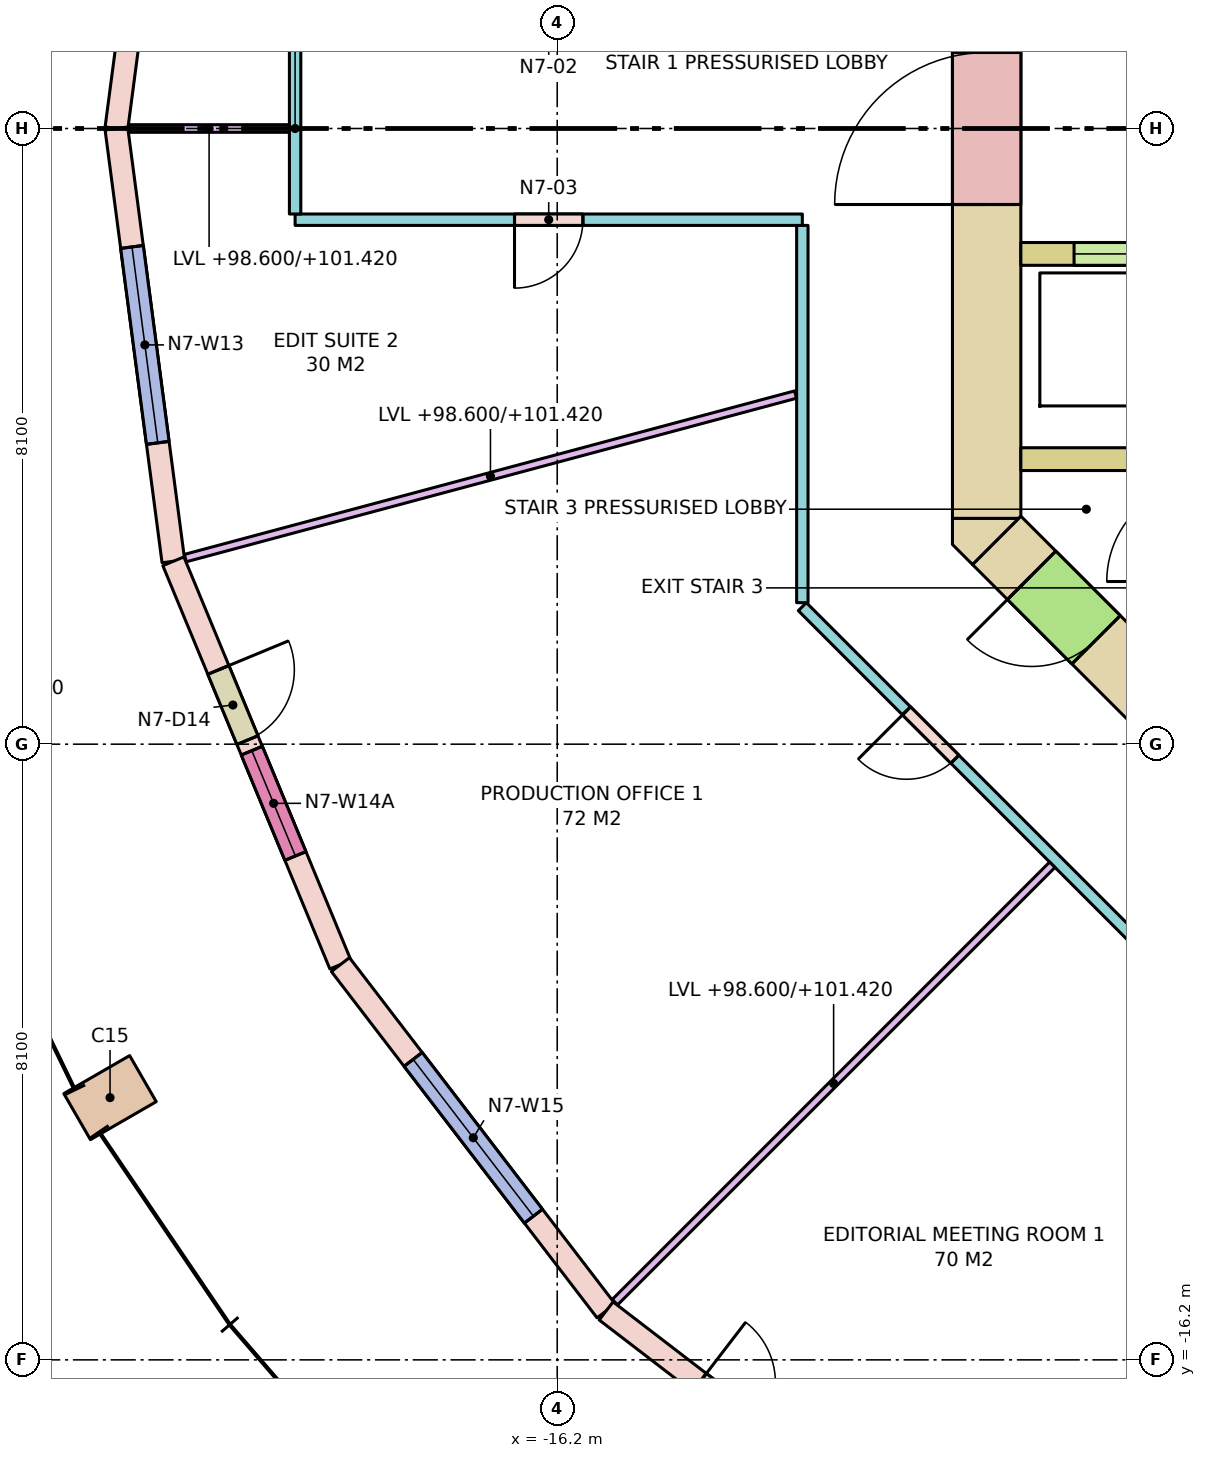
"""IFC4 building model, lengths in metres.
Left out: names, types, materials, properties, quantities, classifications, styles, units other than length and angle.
Written with IfcOpenShell. Run it as: python <this file> out.ifc"""

import sys

from ifc_helpers import new_model, si_unit, direction, frame, frame_2d, origin, origin_2d, place, context, subcontext, project, spatial, polyline, rectangle, outline, extrude, element, fill, save


model = new_model("IFC4")
c1 = context("Model", 3, precision=1e-05, world=origin(), true_north=direction((0.0, 1.0)))
c2 = subcontext(c1, "Body", "Model", "MODEL_VIEW")
j1 = project(units=[si_unit("LENGTHUNIT", "METRE"), si_unit("PLANEANGLEUNIT", "RADIAN")], contexts=[c1])
p1 = place(None, origin())
s1 = spatial("IfcSite", under=j1, at=p1, CompositionType="ELEMENT")
p2 = place(p1, origin())
s2 = spatial("IfcBuilding", under=s1, at=p2, CompositionType="ELEMENT")
p3 = place(p2, frame((0.0, 0.0, 98.6)))
s3 = spatial("IfcBuildingStorey", under=s2, at=p3, CompositionType="ELEMENT", Elevation=98.6)
p4 = place(p3, frame((-22.084, -12.75, 0.0), z_axis=(0.0, 0.0, 1.0), x_axis=(0.5, -0.866025403784, 0.0)))
e1 = element("IfcColumn", 1, at=p4, inside=s3, PredefinedType="COLUMN", context=c2, shape_type="SweptSolid", body=[
    extrude(rectangle(XDim=0.7, YDim=1.0, at=origin_2d()), origin(), (0.0, 0.0, 1.0), 4.0),
])
p5 = place(p3, frame((-10.55, -5.13, -0.28), z_axis=(0.0, 0.0, 1.0), x_axis=(0.0, 1.0, 0.0)))
e2 = element("IfcWall", 2, at=p5, inside=s3, PredefinedType="SHEAR", context=c2, shape_type="SweptSolid", body=[
    extrude(rectangle(XDim=10.26, YDim=0.9, at=frame_2d((5.13, 0.0))), origin(), (0.0, 0.0, 1.0), 4.0),
])
p6 = place(p5, frame((4.13, 0.0, 0.28)))
e3 = element("IfcOpeningElement", 3, at=p6, cuts=e2, PredefinedType="OPENING", context=c2, shape_type="SweptSolid", body=[
    extrude(rectangle(XDim=2.0, YDim=2.1, at=frame_2d((1.0, 1.05))), frame((0.0, 0.46, 0.0), z_axis=(0.0, -1.0, 0.0), x_axis=(1.0, 0.0, 0.0)), (0.0, 0.0, 1.0), 0.92),
])
p7 = place(p3, frame((-7.418, -8.418, -0.28), z_axis=(0.0, 0.0, 1.0), x_axis=(-0.707106781187, 0.707106781187, 0.0)))
e4 = element("IfcWall", 4, at=p7, inside=s3, PredefinedType="SHEAR", context=c2, shape_type="SweptSolid", body=[
    extrude(rectangle(XDim=4.243, YDim=0.9, at=frame_2d((2.121, 0.0))), origin(), (0.0, 0.0, 1.0), 4.0),
])
p8 = place(p7, frame((2.393, 0.0, 0.28)))
e5 = element("IfcOpeningElement", 5, at=p8, cuts=e4, PredefinedType="OPENING", context=c2, shape_type="SweptSolid", body=[
    extrude(rectangle(XDim=1.2, YDim=2.1, at=frame_2d((0.6, 1.05))), frame((0.0, 0.46, 0.0), z_axis=(0.0, -1.0, 0.0), x_axis=(1.0, 0.0, 0.0)), (0.0, 0.0, 1.0), 0.92),
])
p9 = place(p3, frame((0.0, 0.0, -0.28)))
e6 = element("IfcWall", 6, at=p9, inside=s3, PredefinedType="SHEAR", context=c2, shape_type="SweptSolid", body=[
    extrude(outline(polyline([(-11.0, -5.473), (-11.0, -5.13), (-10.13, -5.13), (-10.736, -5.736), (-11.0, -5.473)])), origin(), (0.0, 0.0, 1.0), 4.0),
])
p10 = place(p3, frame((-10.1, -4.35, 0.0), z_axis=(0.0, 0.0, 1.0), x_axis=(1.0, 0.0, 0.0)))
e7 = element("IfcWall", 7, at=p10, inside=s3, PredefinedType="SOLIDWALL", context=c2, shape_type="SweptSolid", body=[
    extrude(rectangle(XDim=8.1, YDim=0.3, at=frame_2d((4.05, 0.0))), origin(), (0.0, 0.0, 1.0), 3.72),
])
p11 = place(p3, frame((-10.1, -1.65, 0.0), z_axis=(0.0, 0.0, 1.0), x_axis=(1.0, 0.0, 0.0)))
e8 = element("IfcWall", 8, at=p11, inside=s3, PredefinedType="SOLIDWALL", context=c2, shape_type="SweptSolid", body=[
    extrude(rectangle(XDim=8.1, YDim=0.3, at=frame_2d((4.05, 0.0))), origin(), (0.0, 0.0, 1.0), 3.72),
])
p12 = place(p11, frame((0.7, 0.0, 0.0)))
e9 = element("IfcOpeningElement", 9, at=p12, cuts=e8, PredefinedType="OPENING", context=c2, shape_type="SweptSolid", body=[
    extrude(rectangle(XDim=1.1, YDim=2.1, at=frame_2d((0.55, 1.05))), frame((0.0, 0.16, 0.0), z_axis=(0.0, -1.0, 0.0), x_axis=(1.0, 0.0, 0.0)), (0.0, 0.0, 1.0), 0.32),
])
p13 = place(p11, frame((3.5, 0.0, 0.0)))
e10 = element("IfcOpeningElement", 10, at=p13, cuts=e8, PredefinedType="OPENING", context=c2, shape_type="SweptSolid", body=[
    extrude(rectangle(XDim=1.1, YDim=2.1, at=frame_2d((0.55, 1.05))), frame((0.0, 0.16, 0.0), z_axis=(0.0, -1.0, 0.0), x_axis=(1.0, 0.0, 0.0)), (0.0, 0.0, 1.0), 0.32),
])
p14 = place(p11, frame((6.15, 0.0, 0.0)))
e11 = element("IfcOpeningElement", 11, at=p14, cuts=e8, PredefinedType="OPENING", context=c2, shape_type="SweptSolid", body=[
    extrude(rectangle(XDim=1.1, YDim=2.1, at=frame_2d((0.55, 1.05))), frame((0.0, 0.16, 0.0), z_axis=(0.0, -1.0, 0.0), x_axis=(1.0, 0.0, 0.0)), (0.0, 0.0, 1.0), 0.32),
])
p15 = place(p3, frame((-21.25, 5.694, 0.0), z_axis=(0.0, 0.0, 1.0), x_axis=(-0.130503995834, -0.991447783331, 0.0)))
e12 = element("IfcWall", 12, at=p15, inside=s3, PredefinedType="STANDARD", context=c2, shape_type="SweptSolid", body=[
    extrude(rectangle(XDim=5.743, YDim=0.3, at=frame_2d((2.872, 0.0))), origin(), (0.0, 0.0, 1.0), 3.72),
])
p16 = place(p15, frame((1.547, 0.0, 0.0)))
e13 = element("IfcOpeningElement", 13, at=p16, cuts=e12, PredefinedType="OPENING", context=c2, shape_type="SweptSolid", body=[
    extrude(rectangle(XDim=1.0, YDim=2.4, at=frame_2d((0.5, 1.2))), frame((0.0, 0.16, 0.0), z_axis=(0.0, -1.0, 0.0), x_axis=(1.0, 0.0, 0.0)), (0.0, 0.0, 1.0), 0.32),
])
p17 = place(p15, frame((2.697, 0.0, 0.8)))
e14 = element("IfcOpeningElement", 14, at=p17, cuts=e12, PredefinedType="OPENING", context=c2, shape_type="SweptSolid", body=[
    extrude(rectangle(XDim=1.5, YDim=2.7, at=frame_2d((0.75, 1.35))), frame((0.0, 0.16, 0.0), z_axis=(0.0, -1.0, 0.0), x_axis=(1.0, 0.0, 0.0)), (0.0, 0.0, 1.0), 0.32),
])
p18 = place(p3, frame((-22.0, 0.0, 0.0), z_axis=(0.0, 0.0, 1.0), x_axis=(0.130503995834, -0.991447783331, 0.0)))
e15 = element("IfcWall", 15, at=p18, inside=s3, PredefinedType="STANDARD", context=c2, shape_type="SweptSolid", body=[
    extrude(rectangle(XDim=5.743, YDim=0.3, at=frame_2d((2.872, 0.0))), origin(), (0.0, 0.0, 1.0), 3.72),
])
p19 = place(p18, frame((1.572, 0.0, 0.8)))
e16 = element("IfcOpeningElement", 16, at=p19, cuts=e15, PredefinedType="OPENING", context=c2, shape_type="SweptSolid", body=[
    extrude(rectangle(XDim=2.6, YDim=2.7, at=frame_2d((1.3, 1.35))), frame((0.0, 0.16, 0.0), z_axis=(0.0, -1.0, 0.0), x_axis=(1.0, 0.0, 0.0)), (0.0, 0.0, 1.0), 0.32),
])
p20 = place(p3, frame((-21.25, -5.694, 0.0), z_axis=(0.0, 0.0, 1.0), x_axis=(0.382715966503, -0.923866055759, 0.0)))
e17 = element("IfcWall", 17, at=p20, inside=s3, PredefinedType="STANDARD", context=c2, shape_type="SweptSolid", body=[
    extrude(rectangle(XDim=5.743, YDim=0.3, at=frame_2d((2.872, 0.0))), origin(), (0.0, 0.0, 1.0), 3.72),
])
p21 = place(p20, frame((1.547, 0.0, 0.0)))
e18 = element("IfcOpeningElement", 18, at=p21, cuts=e17, PredefinedType="OPENING", context=c2, shape_type="SweptSolid", body=[
    extrude(rectangle(XDim=1.0, YDim=2.4, at=frame_2d((0.5, 1.2))), frame((0.0, 0.16, 0.0), z_axis=(0.0, -1.0, 0.0), x_axis=(1.0, 0.0, 0.0)), (0.0, 0.0, 1.0), 0.32),
])
p22 = place(p20, frame((2.697, 0.0, 0.8)))
e19 = element("IfcOpeningElement", 19, at=p22, cuts=e17, PredefinedType="OPENING", context=c2, shape_type="SweptSolid", body=[
    extrude(rectangle(XDim=1.5, YDim=2.7, at=frame_2d((0.75, 1.35))), frame((0.0, 0.16, 0.0), z_axis=(0.0, -1.0, 0.0), x_axis=(1.0, 0.0, 0.0)), (0.0, 0.0, 1.0), 0.32),
])
p23 = place(p3, frame((-19.052, -11.0, 0.0), z_axis=(0.0, 0.0, 1.0), x_axis=(0.608744744291, -0.793366142647, 0.0)))
e20 = element("IfcWall", 20, at=p23, inside=s3, PredefinedType="STANDARD", context=c2, shape_type="SweptSolid", body=[
    extrude(rectangle(XDim=5.743, YDim=0.3, at=frame_2d((2.872, 0.0))), origin(), (0.0, 0.0, 1.0), 3.72),
])
p24 = place(p23, frame((1.572, 0.0, 0.8)))
e21 = element("IfcOpeningElement", 21, at=p24, cuts=e20, PredefinedType="OPENING", context=c2, shape_type="SweptSolid", body=[
    extrude(rectangle(XDim=2.6, YDim=2.7, at=frame_2d((1.3, 1.35))), frame((0.0, 0.16, 0.0), z_axis=(0.0, -1.0, 0.0), x_axis=(1.0, 0.0, 0.0)), (0.0, 0.0, 1.0), 0.32),
])
p25 = place(p3, frame((-15.556, -15.556, 0.0), z_axis=(0.0, 0.0, 1.0), x_axis=(0.793366142647, -0.608744744291, 0.0)))
e22 = element("IfcWall", 22, at=p25, inside=s3, PredefinedType="STANDARD", context=c2, shape_type="SweptSolid", body=[
    extrude(rectangle(XDim=5.743, YDim=0.3, at=frame_2d((2.872, 0.0))), origin(), (0.0, 0.0, 1.0), 3.72),
])
p26 = place(p25, frame((1.547, 0.0, 0.0)))
e23 = element("IfcOpeningElement", 23, at=p26, cuts=e22, PredefinedType="OPENING", context=c2, shape_type="SweptSolid", body=[
    extrude(rectangle(XDim=1.0, YDim=2.4, at=frame_2d((0.5, 1.2))), frame((0.0, 0.16, 0.0), z_axis=(0.0, -1.0, 0.0), x_axis=(1.0, 0.0, 0.0)), (0.0, 0.0, 1.0), 0.32),
])
p27 = place(p25, frame((2.697, 0.0, 0.8)))
e24 = element("IfcOpeningElement", 24, at=p27, cuts=e22, PredefinedType="OPENING", context=c2, shape_type="SweptSolid", body=[
    extrude(rectangle(XDim=1.5, YDim=2.7, at=frame_2d((0.75, 1.35))), frame((0.0, 0.16, 0.0), z_axis=(0.0, -1.0, 0.0), x_axis=(1.0, 0.0, 0.0)), (0.0, 0.0, 1.0), 0.32),
])
p28 = place(p3, frame((-8.291, -10.975, 0.0), z_axis=(0.0, 0.0, 1.0), x_axis=(-0.707106781187, 0.707106781187, 0.0)))
e25 = element("IfcWall", 25, at=p28, inside=s3, PredefinedType="PARTITIONING", context=c2, shape_type="SweptSolid", body=[
    extrude(rectangle(XDim=6.624, YDim=0.15, at=frame_2d((3.312, 0.0))), origin(), (0.0, 0.0, 1.0), 2.82),
])
p29 = place(p28, frame((3.786, 0.0, 0.0)))
e26 = element("IfcOpeningElement", 26, at=p29, cuts=e25, PredefinedType="OPENING", context=c2, shape_type="SweptSolid", body=[
    extrude(rectangle(XDim=0.9, YDim=2.1, at=frame_2d((0.45, 1.05))), frame((0.0, 0.085, 0.0), z_axis=(0.0, -1.0, 0.0), x_axis=(1.0, 0.0, 0.0)), (0.0, 0.0, 1.0), 0.17),
])
p30 = place(p3, frame((-12.975, -6.238, 0.0), z_axis=(0.0, 0.0, 1.0), x_axis=(0.0, 1.0, 0.0)))
e27 = element("IfcWall", 27, at=p30, inside=s3, PredefinedType="PARTITIONING", context=c2, shape_type="SweptSolid", body=[
    extrude(rectangle(XDim=4.963, YDim=0.15, at=frame_2d((2.482, 0.0))), origin(), (0.0, 0.0, 1.0), 2.82),
])
p31 = place(p3, frame((-12.975, -1.2, 0.0), z_axis=(0.0, 0.0, 1.0), x_axis=(-1.0, 0.0, 0.0)))
e28 = element("IfcWall", 28, at=p31, inside=s3, PredefinedType="PARTITIONING", context=c2, shape_type="SweptSolid", body=[
    extrude(rectangle(XDim=6.674, YDim=0.15, at=frame_2d((3.337, 0.0))), origin(), (0.0, 0.0, 1.0), 3.72),
])
p32 = place(p31, frame((2.887, 0.0, 0.0)))
e29 = element("IfcOpeningElement", 29, at=p32, cuts=e28, PredefinedType="OPENING", context=c2, shape_type="SweptSolid", body=[
    extrude(rectangle(XDim=0.9, YDim=2.1, at=frame_2d((0.45, 1.05))), frame((0.0, 0.085, 0.0), z_axis=(0.0, -1.0, 0.0), x_axis=(1.0, 0.0, 0.0)), (0.0, 0.0, 1.0), 0.17),
])
p33 = place(p3, frame((-19.649, -1.125, 0.0), z_axis=(0.0, 0.0, 1.0), x_axis=(0.0, 1.0, 0.0)))
e30 = element("IfcWall", 30, at=p33, inside=s3, PredefinedType="PARTITIONING", context=c2, shape_type="SweptSolid", body=[
    extrude(rectangle(XDim=2.25, YDim=0.15, at=frame_2d((1.125, 0.0))), origin(), (0.0, 0.0, 1.0), 2.82),
])
p34 = place(p3, frame((-19.724, 0.0, 0.0), z_axis=(0.0, 0.0, 1.0), x_axis=(-1.0, 0.0, 0.0)))
e31 = element("IfcWall", 31, at=p34, inside=s3, PredefinedType="PARTITIONING", context=c2, shape_type="SweptSolid", body=[
    extrude(rectangle(XDim=2.113, YDim=0.1, at=frame_2d((1.057, 0.0))), origin(), (0.0, 0.0, 1.0), 2.82),
])
p35 = place(p3, frame((-13.064, -3.5, 0.0), z_axis=(0.0, 0.0, 1.0), x_axis=(-0.965920254223, -0.258839839442, 0.0)))
e32 = element("IfcWall", 32, at=p35, inside=s3, PredefinedType="PARTITIONING", context=c2, shape_type="SweptSolid", body=[
    extrude(rectangle(XDim=8.312, YDim=0.1, at=frame_2d((4.156, 0.0))), origin(), (0.0, 0.0, 1.0), 2.82),
])
p36 = place(p3, frame((-9.686, -9.686, 0.0), z_axis=(0.0, 0.0, 1.0), x_axis=(-0.707106781187, -0.707106781187, 0.0)))
e33 = element("IfcWall", 33, at=p36, inside=s3, PredefinedType="PARTITIONING", context=c2, shape_type="SweptSolid", body=[
    extrude(rectangle(XDim=8.139, YDim=0.1, at=frame_2d((4.069, 0.0))), origin(), (0.0, 0.0, 1.0), 2.82),
])
p37 = place(p19, origin())
e34 = element("IfcWindow", 34, at=p37, inside=s3, PartitioningType="SINGLE_PANEL", PredefinedType="WINDOW", context=c2, shape_type="SweptSolid", body=[
    extrude(rectangle(XDim=2.6, YDim=2.7, at=frame_2d((1.3, 1.35))), frame((0.0, 0.03, 0.0), z_axis=(0.0, -1.0, 0.0), x_axis=(1.0, 0.0, 0.0)), (0.0, 0.0, 1.0), 0.06),
])
fill(e16, e34)
p38 = place(p21, origin())
e35 = element("IfcDoor", 35, at=p38, inside=s3, OperationType="SINGLE_SWING_LEFT", PredefinedType="DOOR", context=c2, shape_type="SweptSolid", body=[
    extrude(rectangle(XDim=1.0, YDim=2.4, at=frame_2d((0.5, 1.2))), frame((0.0, 0.025, 0.0), z_axis=(0.0, -1.0, 0.0), x_axis=(1.0, 0.0, 0.0)), (0.0, 0.0, 1.0), 0.05),
])
fill(e18, e35)
p39 = place(p22, origin())
e36 = element("IfcWindow", 36, at=p39, inside=s3, PartitioningType="SINGLE_PANEL", PredefinedType="WINDOW", context=c2, shape_type="SweptSolid", body=[
    extrude(rectangle(XDim=1.5, YDim=2.7, at=frame_2d((0.75, 1.35))), frame((0.0, 0.03, 0.0), z_axis=(0.0, -1.0, 0.0), x_axis=(1.0, 0.0, 0.0)), (0.0, 0.0, 1.0), 0.06),
])
fill(e19, e36)
p40 = place(p24, origin())
e37 = element("IfcWindow", 37, at=p40, inside=s3, PartitioningType="SINGLE_PANEL", PredefinedType="WINDOW", context=c2, shape_type="SweptSolid", body=[
    extrude(rectangle(XDim=2.6, YDim=2.7, at=frame_2d((1.3, 1.35))), frame((0.0, 0.03, 0.0), z_axis=(0.0, -1.0, 0.0), x_axis=(1.0, 0.0, 0.0)), (0.0, 0.0, 1.0), 0.06),
])
fill(e21, e37)
p41 = place(p12, origin())
e38 = element("IfcDoor", 38, at=p41, inside=s3, OperationType="DOUBLE_DOOR_SLIDING", PredefinedType="DOOR", context=c2, shape_type="SweptSolid", body=[
    extrude(rectangle(XDim=1.1, YDim=2.1, at=frame_2d((0.55, 1.05))), frame((0.0, 0.025, 0.0), z_axis=(0.0, -1.0, 0.0), x_axis=(1.0, 0.0, 0.0)), (0.0, 0.0, 1.0), 0.05),
])
fill(e9, e38)
p42 = place(p8, origin())
e39 = element("IfcDoor", 39, at=p42, inside=s3, OperationType="SINGLE_SWING_RIGHT", PredefinedType="DOOR", context=c2, shape_type="SweptSolid", body=[
    extrude(rectangle(XDim=1.2, YDim=2.1, at=frame_2d((0.6, 1.05))), frame((0.0, 0.025, 0.0), z_axis=(0.0, -1.0, 0.0), x_axis=(1.0, 0.0, 0.0)), (0.0, 0.0, 1.0), 0.05),
])
fill(e5, e39)
p43 = place(p6, origin())
e40 = element("IfcDoor", 40, at=p43, inside=s3, OperationType="DOUBLE_DOOR_SINGLE_SWING", PredefinedType="DOOR", context=c2, shape_type="SweptSolid", body=[
    extrude(rectangle(XDim=2.0, YDim=2.1, at=frame_2d((1.0, 1.05))), frame((0.0, 0.025, 0.0), z_axis=(0.0, -1.0, 0.0), x_axis=(1.0, 0.0, 0.0)), (0.0, 0.0, 1.0), 0.05),
])
fill(e3, e40)
p44 = place(p32, origin())
e41 = element("IfcDoor", 41, at=p44, inside=s3, OperationType="SINGLE_SWING_RIGHT", PredefinedType="DOOR", context=c2, shape_type="SweptSolid", body=[
    extrude(rectangle(XDim=0.9, YDim=2.1, at=frame_2d((0.45, 1.05))), frame((0.0, 0.025, 0.0), z_axis=(0.0, -1.0, 0.0), x_axis=(1.0, 0.0, 0.0)), (0.0, 0.0, 1.0), 0.05),
])
fill(e29, e41)
p45 = place(p29, origin())
e42 = element("IfcDoor", 42, at=p45, inside=s3, OperationType="SINGLE_SWING_RIGHT", PredefinedType="DOOR", context=c2, shape_type="SweptSolid", body=[
    extrude(rectangle(XDim=0.9, YDim=2.1, at=frame_2d((0.45, 1.05))), frame((0.0, 0.025, 0.0), z_axis=(0.0, -1.0, 0.0), x_axis=(1.0, 0.0, 0.0)), (0.0, 0.0, 1.0), 0.05),
])
fill(e26, e42)
save(model, sys.argv[1])
